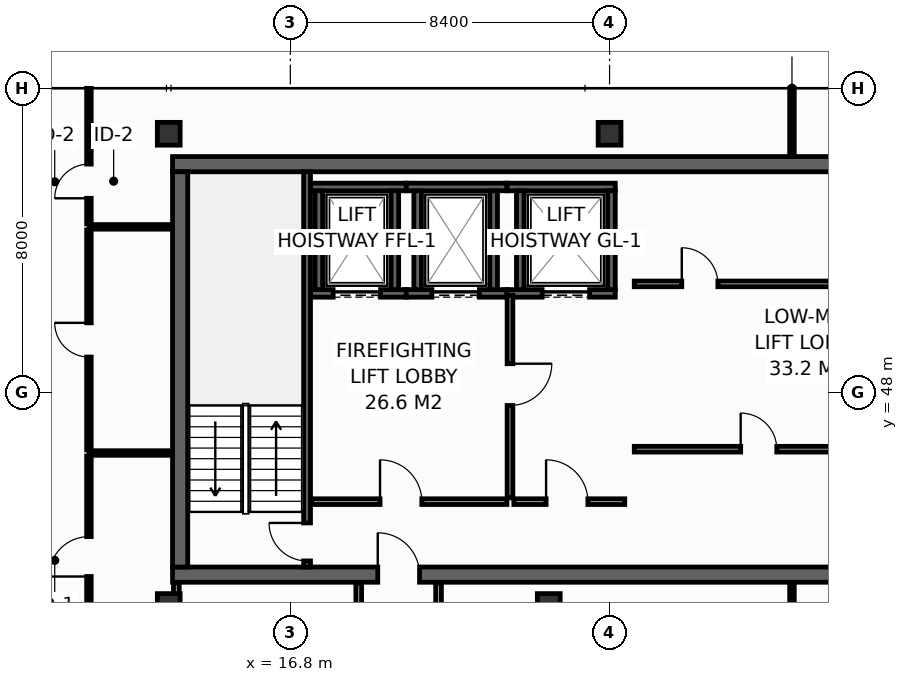
"""IFC4 building model, lengths in metres.
Left out: names, types, materials, properties, quantities, classifications, styles, units other than length and angle.
Written with IfcOpenShell. Run it as: python <this file> out.ifc"""

import sys

from ifc_helpers import new_model, si_unit, direction, frame, frame_2d, origin, origin_2d, place, context, subcontext, project, spatial, rectangle, hollow_rectangle, extrude, element, fill, save


model = new_model("IFC4")
c1 = context("Model", 3, precision=1e-05, world=origin(), true_north=direction((0.0, 1.0)))
c2 = subcontext(c1, "Body", "Model", "MODEL_VIEW")
j1 = project(units=[si_unit("LENGTHUNIT", "METRE"), si_unit("PLANEANGLEUNIT", "RADIAN")], contexts=[c1])
p1 = place(None, origin())
s1 = spatial("IfcSite", under=j1, at=p1, CompositionType="ELEMENT")
p2 = place(p1, origin())
s2 = spatial("IfcBuilding", under=s1, at=p2, CompositionType="ELEMENT")
p3 = place(p2, frame((0.0, 0.0, 280.0)))
s3 = spatial("IfcBuildingStorey", under=s2, at=p3, CompositionType="ELEMENT", Elevation=280.0)
p4 = place(p3, frame((13.7, 43.2, 0.0), z_axis=(0.0, 0.0, 1.0), x_axis=(1.0, 0.0, 0.0)))
e1 = element("IfcWall", 1, at=p4, inside=s3, PredefinedType="SHEAR", context=c2, shape_type="SweptSolid", body=[
    extrude(rectangle(XDim=32.5, YDim=0.4, at=frame_2d((16.25, 0.0))), origin(), (0.0, 0.0, 1.0), 3.55),
])
p5 = place(p4, frame((5.4, 0.0, 0.0)))
e2 = element("IfcOpeningElement", 2, at=p5, cuts=e1, PredefinedType="OPENING", context=c2, shape_type="SweptSolid", body=[
    extrude(rectangle(XDim=1.1, YDim=2.15, at=frame_2d((0.55, 1.075))), frame((0.0, 0.21, 0.0), z_axis=(0.0, -1.0, 0.0), x_axis=(1.0, 0.0, 0.0)), (0.0, 0.0, 1.0), 0.42),
])
p6 = place(p4, frame((25.6, 0.0, 0.0)))
e3 = element("IfcOpeningElement", 3, at=p6, cuts=e1, PredefinedType="OPENING", context=c2, shape_type="SweptSolid", body=[
    extrude(rectangle(XDim=1.1, YDim=2.15, at=frame_2d((0.55, 1.075))), frame((0.0, 0.21, 0.0), z_axis=(0.0, -1.0, 0.0), x_axis=(1.0, 0.0, 0.0)), (0.0, 0.0, 1.0), 0.42),
])
p7 = place(p3, frame((13.7, 54.0, 0.0), z_axis=(0.0, 0.0, 1.0), x_axis=(1.0, 0.0, 0.0)))
e4 = element("IfcWall", 4, at=p7, inside=s3, PredefinedType="SHEAR", context=c2, shape_type="SweptSolid", body=[
    extrude(rectangle(XDim=32.5, YDim=0.4, at=frame_2d((16.25, 0.0))), origin(), (0.0, 0.0, 1.0), 3.55),
])
p8 = place(p3, frame((13.9, 43.4, 0.0), z_axis=(0.0, 0.0, 1.0), x_axis=(0.0, 1.0, 0.0)))
e5 = element("IfcWall", 5, at=p8, inside=s3, PredefinedType="SHEAR", context=c2, shape_type="SweptSolid", body=[
    extrude(rectangle(XDim=10.4, YDim=0.4, at=frame_2d((5.2, 0.0))), origin(), (0.0, 0.0, 1.0), 3.55),
])
for number, where, z_axis, x_axis in (
    (6, (13.6, 54.8, 0.0), (0.0, 0.0, 1.0), (1.0, 0.0, 0.0)),
    (7, (25.2, 54.8, 0.0), (0.0, 0.0, 1.0), (1.0, 0.0, 0.0)),
    (8, (13.6, 42.4, 0.0), (0.0, 0.0, 1.0), (1.0, 0.0, 0.0)),
    (9, (23.6, 42.4, 0.0), (0.0, 0.0, 1.0), (1.0, 0.0, 0.0)),
):
    element("IfcColumn", number, at=place(p3, frame(where, z_axis=z_axis, x_axis=x_axis)), inside=s3, PredefinedType="COLUMN", context=c2, shape_type="SweptSolid", body=[
        extrude(hollow_rectangle(XDim=0.6, YDim=0.6, WallThickness=0.028, at=origin_2d()), origin(), (0.0, 0.0, 1.0), 3.8),
    ])
p9 = place(p3, frame((17.33, 50.6, 0.0), z_axis=(0.0, 0.0, 1.0), x_axis=(1.0, 0.0, 0.0)))
e10 = element("IfcWall", 10, at=p9, inside=s3, PredefinedType="SHEAR", context=c2, shape_type="SweptSolid", body=[
    extrude(rectangle(XDim=2.52, YDim=0.2, at=frame_2d((1.26, 0.0))), origin(), (0.0, 0.0, 1.0), 3.55),
])
p10 = place(p9, frame((0.595, 0.0, 0.0)))
e11 = element("IfcOpeningElement", 11, at=p10, cuts=e10, PredefinedType="OPENING", context=c2, shape_type="SweptSolid", body=[
    extrude(rectangle(XDim=1.25, YDim=2.3, at=frame_2d((0.625, 1.15))), frame((0.0, 0.11, 0.0), z_axis=(0.0, -1.0, 0.0), x_axis=(1.0, 0.0, 0.0)), (0.0, 0.0, 1.0), 0.22),
])
p11 = place(p3, frame((17.33, 53.4, 0.0), z_axis=(0.0, 0.0, 1.0), x_axis=(1.0, 0.0, 0.0)))
e12 = element("IfcWall", 12, at=p11, inside=s3, PredefinedType="SHEAR", context=c2, shape_type="SweptSolid", body=[
    extrude(rectangle(XDim=2.52, YDim=0.2, at=frame_2d((1.26, 0.0))), origin(), (0.0, 0.0, 1.0), 3.55),
])
for number, where, z_axis, x_axis in (
    (13, (17.55, 50.7, 0.0), (0.0, 0.0, 1.0), (0.0, 1.0, 0.0)),
    (14, (19.55, 50.7, 0.0), (0.0, 0.0, 1.0), (0.0, 1.0, 0.0)),
):
    element("IfcWall", number, at=place(p3, frame(where, z_axis=z_axis, x_axis=x_axis)), inside=s3, PredefinedType="SHEAR", context=c2, shape_type="SweptSolid", body=[
        extrude(rectangle(XDim=2.6, YDim=0.2, at=frame_2d((1.3, 0.0))), origin(), (0.0, 0.0, 1.0), 3.55),
    ])
p12 = place(p3, frame((19.85, 50.6, 0.0), z_axis=(0.0, 0.0, 1.0), x_axis=(1.0, 0.0, 0.0)))
e15 = element("IfcWall", 15, at=p12, inside=s3, PredefinedType="SHEAR", context=c2, shape_type="SweptSolid", body=[
    extrude(rectangle(XDim=2.65, YDim=0.2, at=frame_2d((1.325, 0.0))), origin(), (0.0, 0.0, 1.0), 3.55),
])
p13 = place(p12, frame((0.675, 0.0, 0.0)))
e16 = element("IfcOpeningElement", 16, at=p13, cuts=e15, PredefinedType="OPENING", context=c2, shape_type="SweptSolid", body=[
    extrude(rectangle(XDim=1.25, YDim=2.3, at=frame_2d((0.625, 1.15))), frame((0.0, 0.11, 0.0), z_axis=(0.0, -1.0, 0.0), x_axis=(1.0, 0.0, 0.0)), (0.0, 0.0, 1.0), 0.22),
])
p14 = place(p3, frame((19.85, 53.4, 0.0), z_axis=(0.0, 0.0, 1.0), x_axis=(1.0, 0.0, 0.0)))
e17 = element("IfcWall", 17, at=p14, inside=s3, PredefinedType="SHEAR", context=c2, shape_type="SweptSolid", body=[
    extrude(rectangle(XDim=2.65, YDim=0.2, at=frame_2d((1.325, 0.0))), origin(), (0.0, 0.0, 1.0), 3.55),
])
for number, where, z_axis, x_axis in (
    (18, (20.15, 50.7, 0.0), (0.0, 0.0, 1.0), (0.0, 1.0, 0.0)),
    (19, (22.15, 50.7, 0.0), (0.0, 0.0, 1.0), (0.0, 1.0, 0.0)),
):
    element("IfcWall", number, at=place(p3, frame(where, z_axis=z_axis, x_axis=x_axis)), inside=s3, PredefinedType="SHEAR", context=c2, shape_type="SweptSolid", body=[
        extrude(rectangle(XDim=2.6, YDim=0.2, at=frame_2d((1.3, 0.0))), origin(), (0.0, 0.0, 1.0), 3.55),
    ])
p15 = place(p3, frame((22.5, 50.6, 0.0), z_axis=(0.0, 0.0, 1.0), x_axis=(1.0, 0.0, 0.0)))
e20 = element("IfcWall", 20, at=p15, inside=s3, PredefinedType="SHEAR", context=c2, shape_type="SweptSolid", body=[
    extrude(rectangle(XDim=2.85, YDim=0.2, at=frame_2d((1.425, 0.0))), origin(), (0.0, 0.0, 1.0), 3.55),
])
p16 = place(p15, frame((0.925, 0.0, 0.0)))
e21 = element("IfcOpeningElement", 21, at=p16, cuts=e20, PredefinedType="OPENING", context=c2, shape_type="SweptSolid", body=[
    extrude(rectangle(XDim=1.25, YDim=2.3, at=frame_2d((0.625, 1.15))), frame((0.0, 0.11, 0.0), z_axis=(0.0, -1.0, 0.0), x_axis=(1.0, 0.0, 0.0)), (0.0, 0.0, 1.0), 0.22),
])
p17 = place(p3, frame((22.5, 53.4, 0.0), z_axis=(0.0, 0.0, 1.0), x_axis=(1.0, 0.0, 0.0)))
e22 = element("IfcWall", 22, at=p17, inside=s3, PredefinedType="SHEAR", context=c2, shape_type="SweptSolid", body=[
    extrude(rectangle(XDim=2.85, YDim=0.2, at=frame_2d((1.425, 0.0))), origin(), (0.0, 0.0, 1.0), 3.55),
])
for number, where, z_axis, x_axis in (
    (23, (22.85, 50.7, 0.0), (0.0, 0.0, 1.0), (0.0, 1.0, 0.0)),
    (24, (25.25, 50.7, 0.0), (0.0, 0.0, 1.0), (0.0, 1.0, 0.0)),
):
    element("IfcWall", number, at=place(p3, frame(where, z_axis=z_axis, x_axis=x_axis)), inside=s3, PredefinedType="SHEAR", context=c2, shape_type="SweptSolid", body=[
        extrude(rectangle(XDim=2.6, YDim=0.2, at=frame_2d((1.3, 0.0))), origin(), (0.0, 0.0, 1.0), 3.55),
    ])
p18 = place(p3, frame((17.24, 43.4, 0.0), z_axis=(0.0, 0.0, 1.0), x_axis=(0.0, 1.0, 0.0)))
e25 = element("IfcWall", 25, at=p18, inside=s3, PredefinedType="SHEAR", context=c2, shape_type="SweptSolid", body=[
    extrude(rectangle(XDim=10.4, YDim=0.18, at=frame_2d((5.2, 0.0))), origin(), (0.0, 0.0, 1.0), 3.55),
])
p19 = place(p18, frame((0.16, 0.0, 0.0)))
e26 = element("IfcOpeningElement", 26, at=p19, cuts=e25, PredefinedType="OPENING", context=c2, shape_type="SweptSolid", body=[
    extrude(rectangle(XDim=1.0, YDim=2.15, at=frame_2d((0.5, 1.075))), frame((0.0, 0.1, 0.0), z_axis=(0.0, -1.0, 0.0), x_axis=(1.0, 0.0, 0.0)), (0.0, 0.0, 1.0), 0.2),
])
p20 = place(p3, frame((17.36, 45.12, 0.0), z_axis=(0.0, 0.0, 1.0), x_axis=(1.0, 0.0, 0.0)))
e27 = element("IfcWall", 27, at=p20, inside=s3, PredefinedType="PARTITIONING", context=c2, shape_type="SweptSolid", body=[
    extrude(rectangle(XDim=5.14, YDim=0.15, at=frame_2d((2.57, 0.0))), origin(), (0.0, 0.0, 1.0), 3.55),
])
p21 = place(p20, frame((1.8, 0.0, 0.0)))
e28 = element("IfcOpeningElement", 28, at=p21, cuts=e27, PredefinedType="OPENING", context=c2, shape_type="SweptSolid", body=[
    extrude(rectangle(XDim=1.1, YDim=2.15, at=frame_2d((0.55, 1.075))), frame((0.0, 0.085, 0.0), z_axis=(0.0, -1.0, 0.0), x_axis=(1.0, 0.0, 0.0)), (0.0, 0.0, 1.0), 0.17),
])
p22 = place(p3, frame((22.58, 50.55, 0.0), z_axis=(0.0, 0.0, 1.0), x_axis=(0.0, -1.0, 0.0)))
e29 = element("IfcWall", 29, at=p22, inside=s3, PredefinedType="PARTITIONING", context=c2, shape_type="SweptSolid", body=[
    extrude(rectangle(XDim=5.33, YDim=0.15, at=frame_2d((2.665, 0.0))), origin(), (0.0, 0.0, 1.0), 3.55),
])
p23 = place(p22, frame((1.8, 0.0, 0.0)))
e30 = element("IfcOpeningElement", 30, at=p23, cuts=e29, PredefinedType="OPENING", context=c2, shape_type="SweptSolid", body=[
    extrude(rectangle(XDim=1.1, YDim=2.15, at=frame_2d((0.55, 1.075))), frame((0.0, 0.085, 0.0), z_axis=(0.0, -1.0, 0.0), x_axis=(1.0, 0.0, 0.0)), (0.0, 0.0, 1.0), 0.17),
])
p24 = place(p3, frame((22.68, 45.12, 0.0), z_axis=(0.0, 0.0, 1.0), x_axis=(1.0, 0.0, 0.0)))
e31 = element("IfcWall", 31, at=p24, inside=s3, PredefinedType="PARTITIONING", context=c2, shape_type="SweptSolid", body=[
    extrude(rectangle(XDim=2.92, YDim=0.15, at=frame_2d((1.46, 0.0))), origin(), (0.0, 0.0, 1.0), 3.55),
])
p25 = place(p24, frame((0.85, 0.0, 0.0)))
e32 = element("IfcOpeningElement", 32, at=p25, cuts=e31, PredefinedType="OPENING", context=c2, shape_type="SweptSolid", body=[
    extrude(rectangle(XDim=1.1, YDim=2.15, at=frame_2d((0.55, 1.075))), frame((0.0, 0.085, 0.0), z_axis=(0.0, -1.0, 0.0), x_axis=(1.0, 0.0, 0.0)), (0.0, 0.0, 1.0), 0.17),
])
p26 = place(p3, frame((25.85, 50.85, 0.0), z_axis=(0.0, 0.0, 1.0), x_axis=(1.0, 0.0, 0.0)))
e33 = element("IfcWall", 33, at=p26, inside=s3, PredefinedType="PARTITIONING", context=c2, shape_type="SweptSolid", body=[
    extrude(rectangle(XDim=7.65, YDim=0.15, at=frame_2d((3.825, 0.0))), origin(), (0.0, 0.0, 1.0), 3.55),
])
p27 = place(p26, frame((1.25, 0.0, 0.0)))
e34 = element("IfcOpeningElement", 34, at=p27, cuts=e33, PredefinedType="OPENING", context=c2, shape_type="SweptSolid", body=[
    extrude(rectangle(XDim=0.95, YDim=2.15, at=frame_2d((0.475, 1.075))), frame((0.0, 0.085, 0.0), z_axis=(0.0, -1.0, 0.0), x_axis=(1.0, 0.0, 0.0)), (0.0, 0.0, 1.0), 0.17),
])
p28 = place(p3, frame((25.85, 46.5, 0.0), z_axis=(0.0, 0.0, 1.0), x_axis=(1.0, 0.0, 0.0)))
e35 = element("IfcWall", 35, at=p28, inside=s3, PredefinedType="PARTITIONING", context=c2, shape_type="SweptSolid", body=[
    extrude(rectangle(XDim=7.65, YDim=0.15, at=frame_2d((3.825, 0.0))), origin(), (0.0, 0.0, 1.0), 3.55),
])
p29 = place(p28, frame((2.8, 0.0, 0.0)))
e36 = element("IfcOpeningElement", 36, at=p29, cuts=e35, PredefinedType="OPENING", context=c2, shape_type="SweptSolid", body=[
    extrude(rectangle(XDim=0.95, YDim=2.15, at=frame_2d((0.475, 1.075))), frame((0.0, 0.085, 0.0), z_axis=(0.0, -1.0, 0.0), x_axis=(1.0, 0.0, 0.0)), (0.0, 0.0, 1.0), 0.17),
])
p30 = place(p3, frame((11.5, 52.35, 0.0), z_axis=(0.0, 0.0, 1.0), x_axis=(1.0, 0.0, 0.0)))
e37 = element("IfcWall", 37, at=p30, inside=s3, PredefinedType="PARTITIONING", context=c2, shape_type="SweptSolid", body=[
    extrude(rectangle(XDim=2.18, YDim=0.12, at=frame_2d((1.09, 0.0))), origin(), (0.0, 0.0, 1.0), 3.55),
])
p31 = place(p3, frame((30.0, 54.22, 0.0), z_axis=(0.0, 0.0, 1.0), x_axis=(0.0, 1.0, 0.0)))
e38 = element("IfcWall", 38, at=p31, inside=s3, PredefinedType="PARTITIONING", context=c2, shape_type="SweptSolid", body=[
    extrude(rectangle(XDim=1.775, YDim=0.12, at=frame_2d((0.888, 0.0))), origin(), (0.0, 0.0, 1.0), 2.935),
])
p32 = place(p3, frame((11.5, 52.43, 0.0), z_axis=(0.0, 0.0, 1.0), x_axis=(0.0, 1.0, 0.0)))
e39 = element("IfcWall", 39, at=p32, inside=s3, PredefinedType="PARTITIONING", context=c2, shape_type="SweptSolid", body=[
    extrude(rectangle(XDim=3.565, YDim=0.12, at=frame_2d((1.783, 0.0))), origin(), (0.0, 0.0, 1.0), 2.935),
])
p33 = place(p32, frame((0.672, 0.0, 0.0)))
e40 = element("IfcOpeningElement", 40, at=p33, cuts=e39, PredefinedType="OPENING", context=c2, shape_type="SweptSolid", body=[
    extrude(rectangle(XDim=0.9, YDim=2.1, at=frame_2d((0.45, 1.05))), frame((0.0, 0.07, 0.0), z_axis=(0.0, -1.0, 0.0), x_axis=(1.0, 0.0, 0.0)), (0.0, 0.0, 1.0), 0.14),
])
p34 = place(p3, frame((11.5, 46.4, 0.0), z_axis=(0.0, 0.0, 1.0), x_axis=(1.0, 0.0, 0.0)))
e41 = element("IfcWall", 41, at=p34, inside=s3, PredefinedType="PARTITIONING", context=c2, shape_type="SweptSolid", body=[
    extrude(rectangle(XDim=2.18, YDim=0.12, at=frame_2d((1.09, 0.0))), origin(), (0.0, 0.0, 1.0), 3.55),
])
p35 = place(p3, frame((11.5, 41.03, 0.0), z_axis=(0.0, 0.0, 1.0), x_axis=(0.0, 1.0, 0.0)))
e42 = element("IfcWall", 42, at=p35, inside=s3, PredefinedType="PARTITIONING", context=c2, shape_type="SweptSolid", body=[
    extrude(rectangle(XDim=5.29, YDim=0.12, at=frame_2d((2.645, 0.0))), origin(), (0.0, 0.0, 1.0), 2.947),
])
p36 = place(p35, frame((2.12, 0.0, 0.0)))
e43 = element("IfcOpeningElement", 43, at=p36, cuts=e42, PredefinedType="OPENING", context=c2, shape_type="SweptSolid", body=[
    extrude(rectangle(XDim=1.05, YDim=2.15, at=frame_2d((0.525, 1.075))), frame((0.0, 0.07, 0.0), z_axis=(0.0, -1.0, 0.0), x_axis=(1.0, 0.0, 0.0)), (0.0, 0.0, 1.0), 0.14),
])
p37 = place(p3, frame((11.5, 46.48, 0.0), z_axis=(0.0, 0.0, 1.0), x_axis=(0.0, 1.0, 0.0)))
e44 = element("IfcWall", 44, at=p37, inside=s3, PredefinedType="PARTITIONING", context=c2, shape_type="SweptSolid", body=[
    extrude(rectangle(XDim=5.79, YDim=0.12, at=frame_2d((2.895, 0.0))), origin(), (0.0, 0.0, 1.0), 3.55),
])
p38 = place(p37, frame((2.445, 0.0, 0.0)))
e45 = element("IfcOpeningElement", 45, at=p38, cuts=e44, PredefinedType="OPENING", context=c2, shape_type="SweptSolid", body=[
    extrude(rectangle(XDim=0.9, YDim=2.1, at=frame_2d((0.45, 1.05))), frame((0.0, 0.07, 0.0), z_axis=(0.0, -1.0, 0.0), x_axis=(1.0, 0.0, 0.0)), (0.0, 0.0, 1.0), 0.14),
])
p39 = place(p3, frame((13.8, 41.03, 0.0), z_axis=(0.0, 0.0, 1.0), x_axis=(0.0, 1.0, 0.0)))
e46 = element("IfcWall", 46, at=p39, inside=s3, PredefinedType="PARTITIONING", context=c2, shape_type="SweptSolid", body=[
    extrude(rectangle(XDim=1.95, YDim=0.15, at=frame_2d((0.975, 0.0))), origin(), (0.0, 0.0, 1.0), 3.55),
])
for number, where, z_axis, x_axis in (
    (47, (18.6, 40.95, 0.0), (0.0, 0.0, 1.0), (0.0, 1.0, 0.0)),
    (48, (20.7, 40.95, 0.0), (0.0, 0.0, 1.0), (0.0, 1.0, 0.0)),
):
    element("IfcWall", number, at=place(p3, frame(where, z_axis=z_axis, x_axis=x_axis)), inside=s3, PredefinedType="PARTITIONING", context=c2, shape_type="SweptSolid", body=[
        extrude(rectangle(XDim=2.03, YDim=0.15, at=frame_2d((1.015, 0.0))), origin(), (0.0, 0.0, 1.0), 3.55),
    ])
p40 = place(p3, frame((30.0, 40.95, 0.0), z_axis=(0.0, 0.0, 1.0), x_axis=(0.0, 1.0, 0.0)))
e49 = element("IfcWall", 49, at=p40, inside=s3, PredefinedType="PARTITIONING", context=c2, shape_type="SweptSolid", body=[
    extrude(rectangle(XDim=2.03, YDim=0.12, at=frame_2d((1.015, 0.0))), origin(), (0.0, 0.0, 1.0), 2.947),
])
p41 = place(p10, origin())
e50 = element("IfcDoor", 50, at=p41, inside=s3, OperationType="SLIDING_TO_LEFT", PredefinedType="DOOR", context=c2, shape_type="SweptSolid", body=[
    extrude(rectangle(XDim=1.25, YDim=2.3, at=frame_2d((0.625, 1.15))), frame((0.0, 0.025, 0.0), z_axis=(0.0, -1.0, 0.0), x_axis=(1.0, 0.0, 0.0)), (0.0, 0.0, 1.0), 0.05),
])
fill(e11, e50)
p42 = place(p13, origin())
e51 = element("IfcDoor", 51, at=p42, inside=s3, OperationType="SLIDING_TO_LEFT", PredefinedType="DOOR", context=c2, shape_type="SweptSolid", body=[
    extrude(rectangle(XDim=1.25, YDim=2.3, at=frame_2d((0.625, 1.15))), frame((0.0, 0.025, 0.0), z_axis=(0.0, -1.0, 0.0), x_axis=(1.0, 0.0, 0.0)), (0.0, 0.0, 1.0), 0.05),
])
fill(e16, e51)
p43 = place(p16, origin())
e52 = element("IfcDoor", 52, at=p43, inside=s3, OperationType="SLIDING_TO_LEFT", PredefinedType="DOOR", context=c2, shape_type="SweptSolid", body=[
    extrude(rectangle(XDim=1.25, YDim=2.3, at=frame_2d((0.625, 1.15))), frame((0.0, 0.025, 0.0), z_axis=(0.0, -1.0, 0.0), x_axis=(1.0, 0.0, 0.0)), (0.0, 0.0, 1.0), 0.05),
])
fill(e21, e52)
p44 = place(p19, origin())
e53 = element("IfcDoor", 53, at=p44, inside=s3, OperationType="SINGLE_SWING_RIGHT", PredefinedType="DOOR", context=c2, shape_type="SweptSolid", body=[
    extrude(rectangle(XDim=1.0, YDim=2.15, at=frame_2d((0.5, 1.075))), frame((0.0, 0.025, 0.0), z_axis=(0.0, -1.0, 0.0), x_axis=(1.0, 0.0, 0.0)), (0.0, 0.0, 1.0), 0.05),
])
fill(e26, e53)
p45 = place(p21, origin())
e54 = element("IfcDoor", 54, at=p45, inside=s3, OperationType="SINGLE_SWING_LEFT", PredefinedType="DOOR", context=c2, shape_type="SweptSolid", body=[
    extrude(rectangle(XDim=1.1, YDim=2.15, at=frame_2d((0.55, 1.075))), frame((0.0, 0.025, 0.0), z_axis=(0.0, -1.0, 0.0), x_axis=(1.0, 0.0, 0.0)), (0.0, 0.0, 1.0), 0.05),
])
fill(e28, e54)
p46 = place(p23, origin())
e55 = element("IfcDoor", 55, at=p46, inside=s3, OperationType="SINGLE_SWING_LEFT", PredefinedType="DOOR", context=c2, shape_type="SweptSolid", body=[
    extrude(rectangle(XDim=1.1, YDim=2.15, at=frame_2d((0.55, 1.075))), frame((0.0, 0.025, 0.0), z_axis=(0.0, -1.0, 0.0), x_axis=(1.0, 0.0, 0.0)), (0.0, 0.0, 1.0), 0.05),
])
fill(e30, e55)
p47 = place(p25, origin())
e56 = element("IfcDoor", 56, at=p47, inside=s3, OperationType="SINGLE_SWING_LEFT", PredefinedType="DOOR", context=c2, shape_type="SweptSolid", body=[
    extrude(rectangle(XDim=1.1, YDim=2.15, at=frame_2d((0.55, 1.075))), frame((0.0, 0.025, 0.0), z_axis=(0.0, -1.0, 0.0), x_axis=(1.0, 0.0, 0.0)), (0.0, 0.0, 1.0), 0.05),
])
fill(e32, e56)
p48 = place(p5, origin())
e57 = element("IfcDoor", 57, at=p48, inside=s3, OperationType="SINGLE_SWING_LEFT", PredefinedType="DOOR", context=c2, shape_type="SweptSolid", body=[
    extrude(rectangle(XDim=1.1, YDim=2.15, at=frame_2d((0.55, 1.075))), frame((0.0, 0.025, 0.0), z_axis=(0.0, -1.0, 0.0), x_axis=(1.0, 0.0, 0.0)), (0.0, 0.0, 1.0), 0.05),
])
fill(e2, e57)
p49 = place(p27, origin())
e58 = element("IfcDoor", 58, at=p49, inside=s3, OperationType="SINGLE_SWING_LEFT", PredefinedType="DOOR", context=c2, shape_type="SweptSolid", body=[
    extrude(rectangle(XDim=0.95, YDim=2.15, at=frame_2d((0.475, 1.075))), frame((0.0, 0.025, 0.0), z_axis=(0.0, -1.0, 0.0), x_axis=(1.0, 0.0, 0.0)), (0.0, 0.0, 1.0), 0.05),
])
fill(e34, e58)
p50 = place(p29, origin())
e59 = element("IfcDoor", 59, at=p50, inside=s3, OperationType="SINGLE_SWING_LEFT", PredefinedType="DOOR", context=c2, shape_type="SweptSolid", body=[
    extrude(rectangle(XDim=0.95, YDim=2.15, at=frame_2d((0.475, 1.075))), frame((0.0, 0.025, 0.0), z_axis=(0.0, -1.0, 0.0), x_axis=(1.0, 0.0, 0.0)), (0.0, 0.0, 1.0), 0.05),
])
fill(e36, e59)
p51 = place(p33, origin())
e60 = element("IfcDoor", 60, at=p51, inside=s3, OperationType="SINGLE_SWING_LEFT", PredefinedType="DOOR", context=c2, shape_type="SweptSolid", body=[
    extrude(rectangle(XDim=0.9, YDim=2.1, at=frame_2d((0.45, 1.05))), frame((0.0, 0.025, 0.0), z_axis=(0.0, -1.0, 0.0), x_axis=(1.0, 0.0, 0.0)), (0.0, 0.0, 1.0), 0.05),
])
fill(e40, e60)
p52 = place(p36, origin())
e61 = element("IfcDoor", 61, at=p52, inside=s3, OperationType="SINGLE_SWING_LEFT", PredefinedType="DOOR", context=c2, shape_type="SweptSolid", body=[
    extrude(rectangle(XDim=1.05, YDim=2.15, at=frame_2d((0.525, 1.075))), frame((0.0, 0.025, 0.0), z_axis=(0.0, -1.0, 0.0), x_axis=(1.0, 0.0, 0.0)), (0.0, 0.0, 1.0), 0.05),
])
fill(e43, e61)
p53 = place(p38, origin())
e62 = element("IfcDoor", 62, at=p53, inside=s3, OperationType="SINGLE_SWING_RIGHT", PredefinedType="DOOR", context=c2, shape_type="SweptSolid", body=[
    extrude(rectangle(XDim=0.9, YDim=2.1, at=frame_2d((0.45, 1.05))), frame((0.0, 0.025, 0.0), z_axis=(0.0, -1.0, 0.0), x_axis=(1.0, 0.0, 0.0)), (0.0, 0.0, 1.0), 0.05),
])
fill(e45, e62)
save(model, sys.argv[1])
